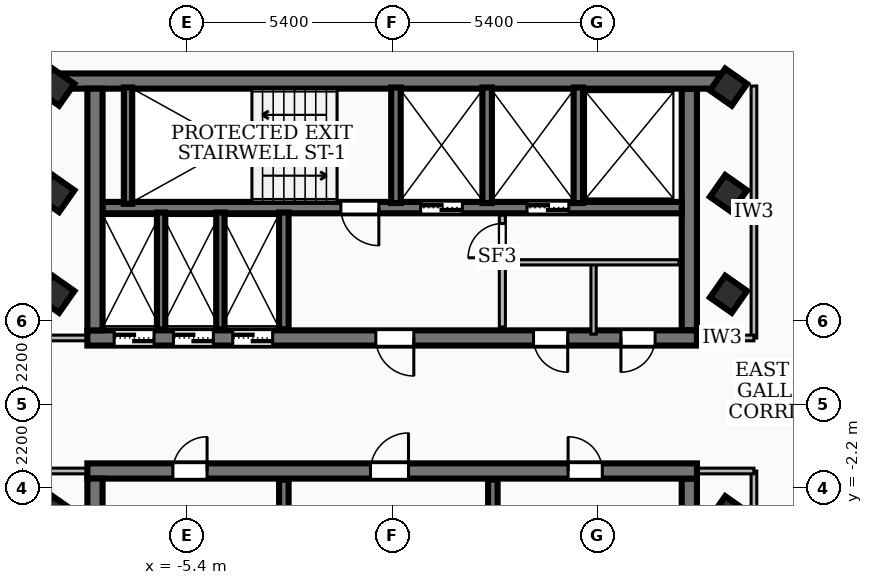
"""IFC4 building model, lengths in metres.
Left out: names, types, materials, properties, quantities, classifications, styles, units other than length and angle.
Written with IfcOpenShell. Run it as: python <this file> out.ifc"""

import sys

from ifc_helpers import new_model, si_unit, direction, frame, frame_2d, origin, origin_2d, place, context, subcontext, project, spatial, rectangle, extrude, element, fill, save


model = new_model("IFC4")
c1 = context("Model", 3, precision=1e-05, world=origin(), true_north=direction((0.0, 1.0)))
c2 = subcontext(c1, "Body", "Model", "MODEL_VIEW")
j1 = project(units=[si_unit("LENGTHUNIT", "METRE"), si_unit("PLANEANGLEUNIT", "RADIAN")], contexts=[c1])
p1 = place(None, origin())
s1 = spatial("IfcSite", under=j1, at=p1, CompositionType="ELEMENT")
p2 = place(p1, origin())
s2 = spatial("IfcBuilding", under=s1, at=p2, CompositionType="ELEMENT")
p3 = place(p2, frame((0.0, 0.0, 268.02)))
s3 = spatial("IfcBuildingStorey", under=s2, at=p3, CompositionType="ELEMENT", Elevation=268.02)
p4 = place(p3, frame((-8.78, 8.51, 0.0), z_axis=(0.0, 0.0, 1.0), x_axis=(1.0, 0.0, 0.0)))
e1 = element("IfcWall", 1, at=p4, inside=s3, PredefinedType="SHEAR", context=c2, shape_type="SweptSolid", body=[
    extrude(rectangle(XDim=17.56, YDim=0.4, at=frame_2d((8.78, 0.0))), origin(), (0.0, 0.0, 1.0), 3.16),
])
p5 = place(p3, frame((8.02, 1.75, 0.0), z_axis=(0.0, 0.0, 1.0), x_axis=(-1.0, 0.0, 0.0)))
e2 = element("IfcWall", 2, at=p5, inside=s3, PredefinedType="SHEAR", context=c2, shape_type="SweptSolid", body=[
    extrude(rectangle(XDim=16.04, YDim=0.4, at=frame_2d((8.02, 0.0))), origin(), (0.0, 0.0, 1.0), 3.16),
])
p6 = place(p5, frame((7.45, 0.0, 0.0)))
e3 = element("IfcOpeningElement", 3, at=p6, cuts=e2, PredefinedType="OPENING", context=c2, shape_type="SweptSolid", body=[
    extrude(rectangle(XDim=1.0, YDim=2.1, at=frame_2d((0.5, 1.05))), frame((0.0, 0.21, 0.0), z_axis=(0.0, -1.0, 0.0), x_axis=(1.0, 0.0, 0.0)), (0.0, 0.0, 1.0), 0.42),
])
p7 = place(p5, frame((14.285, 0.0, 0.0)))
e4 = element("IfcOpeningElement", 4, at=p7, cuts=e2, PredefinedType="OPENING", context=c2, shape_type="SweptSolid", body=[
    extrude(rectangle(XDim=1.05, YDim=2.15, at=frame_2d((0.525, 1.075))), frame((0.0, 0.21, 0.0), z_axis=(0.0, -1.0, 0.0), x_axis=(1.0, 0.0, 0.0)), (0.0, 0.0, 1.0), 0.42),
])
p8 = place(p5, frame((12.725, 0.0, 0.0)))
e5 = element("IfcOpeningElement", 5, at=p8, cuts=e2, PredefinedType="OPENING", context=c2, shape_type="SweptSolid", body=[
    extrude(rectangle(XDim=1.05, YDim=2.15, at=frame_2d((0.525, 1.075))), frame((0.0, 0.21, 0.0), z_axis=(0.0, -1.0, 0.0), x_axis=(1.0, 0.0, 0.0)), (0.0, 0.0, 1.0), 0.42),
])
p9 = place(p5, frame((11.165, 0.0, 0.0)))
e6 = element("IfcOpeningElement", 6, at=p9, cuts=e2, PredefinedType="OPENING", context=c2, shape_type="SweptSolid", body=[
    extrude(rectangle(XDim=1.05, YDim=2.15, at=frame_2d((0.525, 1.075))), frame((0.0, 0.21, 0.0), z_axis=(0.0, -1.0, 0.0), x_axis=(1.0, 0.0, 0.0)), (0.0, 0.0, 1.0), 0.42),
])
p10 = place(p5, frame((3.4, 0.0, 0.0)))
e7 = element("IfcOpeningElement", 7, at=p10, cuts=e2, PredefinedType="OPENING", context=c2, shape_type="SweptSolid", body=[
    extrude(rectangle(XDim=0.9, YDim=2.06, at=frame_2d((0.45, 1.03))), frame((0.0, 0.21, 0.0), z_axis=(0.0, -1.0, 0.0), x_axis=(1.0, 0.0, 0.0)), (0.0, 0.0, 1.0), 0.42),
])
p11 = place(p5, frame((1.1, 0.0, 0.0)))
e8 = element("IfcOpeningElement", 8, at=p11, cuts=e2, PredefinedType="OPENING", context=c2, shape_type="SweptSolid", body=[
    extrude(rectangle(XDim=0.9, YDim=2.06, at=frame_2d((0.45, 1.03))), frame((0.0, 0.21, 0.0), z_axis=(0.0, -1.0, 0.0), x_axis=(1.0, 0.0, 0.0)), (0.0, 0.0, 1.0), 0.42),
])
for number, where, z_axis, x_axis in (
    (9, (-7.82, 1.95, 0.0), (0.0, 0.0, 1.0), (0.0, 1.0, 0.0)),
    (10, (7.82, 8.31, 0.0), (0.0, 0.0, 1.0), (0.0, -1.0, 0.0)),
):
    element("IfcWall", number, at=place(p3, frame(where, z_axis=z_axis, x_axis=x_axis)), inside=s3, PredefinedType="SHEAR", context=c2, shape_type="SweptSolid", body=[
        extrude(rectangle(XDim=6.36, YDim=0.4, at=frame_2d((3.18, 0.0))), origin(), (0.0, 0.0, 1.0), 3.16),
    ])
p12 = place(p3, frame((7.62, 5.18, 0.0), z_axis=(0.0, 0.0, 1.0), x_axis=(-1.0, 0.0, 0.0)))
e11 = element("IfcWall", 11, at=p12, inside=s3, PredefinedType="SOLIDWALL", context=c2, shape_type="SweptSolid", body=[
    extrude(rectangle(XDim=15.24, YDim=0.3, at=frame_2d((7.62, 0.0))), origin(), (0.0, 0.0, 1.0), 3.16),
])
p13 = place(p12, frame((5.77, 0.0, 0.0)))
e12 = element("IfcOpeningElement", 12, at=p13, cuts=e11, PredefinedType="OPENING", context=c2, shape_type="SweptSolid", body=[
    extrude(rectangle(XDim=1.1, YDim=2.15, at=frame_2d((0.55, 1.075))), frame((0.0, 0.16, 0.0), z_axis=(0.0, -1.0, 0.0), x_axis=(1.0, 0.0, 0.0)), (0.0, 0.0, 1.0), 0.32),
])
p14 = place(p12, frame((2.97, 0.0, 0.0)))
e13 = element("IfcOpeningElement", 13, at=p14, cuts=e11, PredefinedType="OPENING", context=c2, shape_type="SweptSolid", body=[
    extrude(rectangle(XDim=1.1, YDim=2.15, at=frame_2d((0.55, 1.075))), frame((0.0, 0.16, 0.0), z_axis=(0.0, -1.0, 0.0), x_axis=(1.0, 0.0, 0.0)), (0.0, 0.0, 1.0), 0.32),
])
p15 = place(p12, frame((7.97, 0.0, 0.0)))
e14 = element("IfcOpeningElement", 14, at=p15, cuts=e11, PredefinedType="OPENING", context=c2, shape_type="SweptSolid", body=[
    extrude(rectangle(XDim=1.0, YDim=2.1, at=frame_2d((0.5, 1.05))), frame((0.0, 0.16, 0.0), z_axis=(0.0, -1.0, 0.0), x_axis=(1.0, 0.0, 0.0)), (0.0, 0.0, 1.0), 0.32),
])
p16 = place(p3, frame((-8.02, -1.75, 0.0), z_axis=(0.0, 0.0, 1.0), x_axis=(1.0, 0.0, 0.0)))
e15 = element("IfcWall", 15, at=p16, inside=s3, PredefinedType="SHEAR", context=c2, shape_type="SweptSolid", body=[
    extrude(rectangle(XDim=16.04, YDim=0.4, at=frame_2d((8.02, 0.0))), origin(), (0.0, 0.0, 1.0), 3.16),
])
p17 = place(p16, frame((7.45, 0.0, 0.0)))
e16 = element("IfcOpeningElement", 16, at=p17, cuts=e15, PredefinedType="OPENING", context=c2, shape_type="SweptSolid", body=[
    extrude(rectangle(XDim=1.0, YDim=2.1, at=frame_2d((0.5, 1.05))), frame((0.0, 0.21, 0.0), z_axis=(0.0, -1.0, 0.0), x_axis=(1.0, 0.0, 0.0)), (0.0, 0.0, 1.0), 0.42),
])
p18 = place(p16, frame((12.65, 0.0, 0.0)))
e17 = element("IfcOpeningElement", 17, at=p18, cuts=e15, PredefinedType="OPENING", context=c2, shape_type="SweptSolid", body=[
    extrude(rectangle(XDim=0.9, YDim=2.06, at=frame_2d((0.45, 1.03))), frame((0.0, 0.21, 0.0), z_axis=(0.0, -1.0, 0.0), x_axis=(1.0, 0.0, 0.0)), (0.0, 0.0, 1.0), 0.42),
])
p19 = place(p16, frame((2.25, 0.0, 0.0)))
e18 = element("IfcOpeningElement", 18, at=p19, cuts=e15, PredefinedType="OPENING", context=c2, shape_type="SweptSolid", body=[
    extrude(rectangle(XDim=0.9, YDim=2.06, at=frame_2d((0.45, 1.03))), frame((0.0, 0.21, 0.0), z_axis=(0.0, -1.0, 0.0), x_axis=(1.0, 0.0, 0.0)), (0.0, 0.0, 1.0), 0.42),
])
for number, where, z_axis, x_axis in (
    (19, (-7.82, -8.31, 0.0), (0.0, 0.0, 1.0), (0.0, 1.0, 0.0)),
    (20, (7.82, -1.95, 0.0), (0.0, 0.0, 1.0), (0.0, -1.0, 0.0)),
):
    element("IfcWall", number, at=place(p3, frame(where, z_axis=z_axis, x_axis=x_axis)), inside=s3, PredefinedType="SHEAR", context=c2, shape_type="SweptSolid", body=[
        extrude(rectangle(XDim=6.36, YDim=0.4, at=frame_2d((3.18, 0.0))), origin(), (0.0, 0.0, 1.0), 3.16),
    ])
p20 = place(p3, frame((-6.95, 5.28, 0.0), z_axis=(0.0, 0.0, 1.0), x_axis=(0.0, 1.0, 0.0)))
e21 = element("IfcWall", 21, at=p20, inside=s3, PredefinedType="SOLIDWALL", context=c2, shape_type="SweptSolid", body=[
    extrude(rectangle(XDim=3.06, YDim=0.22, at=frame_2d((1.53, 0.0))), origin(), (0.0, 0.0, 1.0), 3.16),
])
for number, where, z_axis, x_axis in (
    (22, (0.1, 5.3, 0.0), (0.0, 0.0, 1.0), (0.0, 1.0, 0.0)),
    (23, (2.5, 5.3, 0.0), (0.0, 0.0, 1.0), (0.0, 1.0, 0.0)),
    (24, (4.9, 5.3, 0.0), (0.0, 0.0, 1.0), (0.0, 1.0, 0.0)),
):
    element("IfcWall", number, at=place(p3, frame(where, z_axis=z_axis, x_axis=x_axis)), inside=s3, PredefinedType="SOLIDWALL", context=c2, shape_type="SweptSolid", body=[
        extrude(rectangle(XDim=3.04, YDim=0.25, at=frame_2d((1.52, 0.0))), origin(), (0.0, 0.0, 1.0), 3.16),
    ])
for number, where, z_axis, x_axis in (
    (25, (-2.85, 1.98, 0.0), (0.0, 0.0, 1.0), (0.0, 1.0, 0.0)),
    (26, (-2.85, -5.05, 0.0), (0.0, 0.0, 1.0), (0.0, 1.0, 0.0)),
    (27, (2.65, -5.05, 0.0), (0.0, 0.0, 1.0), (0.0, 1.0, 0.0)),
):
    element("IfcWall", number, at=place(p3, frame(where, z_axis=z_axis, x_axis=x_axis)), inside=s3, PredefinedType="SOLIDWALL", context=c2, shape_type="SweptSolid", body=[
        extrude(rectangle(XDim=3.07, YDim=0.25, at=frame_2d((1.535, 0.0))), origin(), (0.0, 0.0, 1.0), 3.16),
    ])
for number, where, z_axis, x_axis in (
    (28, (-6.08, 1.98, 0.0), (0.0, 0.0, 1.0), (0.0, 1.0, 0.0)),
    (29, (-4.52, 1.98, 0.0), (0.0, 0.0, 1.0), (0.0, 1.0, 0.0)),
):
    element("IfcWall", number, at=place(p3, frame(where, z_axis=z_axis, x_axis=x_axis)), inside=s3, PredefinedType="SOLIDWALL", context=c2, shape_type="SweptSolid", body=[
        extrude(rectangle(XDim=3.07, YDim=0.22, at=frame_2d((1.535, 0.0))), origin(), (0.0, 0.0, 1.0), 3.16),
    ])
for number, where, z_axis, x_axis in (
    (30, (-8.85, -2.9, 0.0), (0.0, 0.0, 1.0), (0.574, 0.819, 0.0)),
    (31, (-8.85, 2.9, 0.0), (0.0, 0.0, 1.0), (0.574, 0.819, 0.0)),
    (32, (-8.85, 5.55, 0.0), (0.0, 0.0, 1.0), (0.574, 0.819, 0.0)),
    (33, (8.85, -2.9, 0.0), (0.0, 0.0, 1.0), (0.574, 0.819, 0.0)),
    (34, (8.85, 2.9, 0.0), (0.0, 0.0, 1.0), (0.574, 0.819, 0.0)),
    (35, (8.85, 5.55, 0.0), (0.0, 0.0, 1.0), (0.574, 0.819, 0.0)),
    (36, (-8.85, 8.35, 0.0), (0.0, 0.0, 1.0), (0.574, 0.819, 0.0)),
    (37, (8.85, 8.35, 0.0), (0.0, 0.0, 1.0), (0.574, 0.819, 0.0)),
):
    element("IfcColumn", number, at=place(p3, frame(where, z_axis=z_axis, x_axis=x_axis)), inside=s3, PredefinedType="COLUMN", context=c2, shape_type="SweptSolid", body=[
        extrude(rectangle(XDim=0.7, YDim=0.7, at=origin_2d()), origin(), (0.0, 0.0, 1.0), 3.42),
    ])
p21 = place(p3, frame((2.9, 2.04, 0.0), z_axis=(0.0, 0.0, 1.0), x_axis=(0.0, 1.0, 0.0)))
e38 = element("IfcWall", 38, at=p21, inside=s3, PredefinedType="PARTITIONING", context=c2, shape_type="SweptSolid", body=[
    extrude(rectangle(XDim=2.94, YDim=0.16, at=frame_2d((1.47, 0.0))), origin(), (0.0, 0.0, 1.0), 2.39),
])
p22 = place(p21, frame((1.82, 0.0, 0.0)))
e39 = element("IfcOpeningElement", 39, at=p22, cuts=e38, PredefinedType="OPENING", context=c2, shape_type="SweptSolid", body=[
    extrude(rectangle(XDim=0.9, YDim=2.06, at=frame_2d((0.45, 1.03))), frame((0.0, 0.09, 0.0), z_axis=(0.0, -1.0, 0.0), x_axis=(1.0, 0.0, 0.0)), (0.0, 0.0, 1.0), 0.18),
])
p23 = place(p3, frame((2.9, 3.74, 0.0), z_axis=(0.0, 0.0, 1.0), x_axis=(1.0, 0.0, 0.0)))
e40 = element("IfcWall", 40, at=p23, inside=s3, PredefinedType="PARTITIONING", context=c2, shape_type="SweptSolid", body=[
    extrude(rectangle(XDim=4.65, YDim=0.138, at=frame_2d((2.325, 0.0))), origin(), (0.0, 0.0, 1.0), 3.16),
])
p24 = place(p3, frame((5.3, 1.85, 0.0), z_axis=(0.0, 0.0, 1.0), x_axis=(0.0, 1.0, 0.0)))
e41 = element("IfcWall", 41, at=p24, inside=s3, PredefinedType="PARTITIONING", context=c2, shape_type="SweptSolid", body=[
    extrude(rectangle(XDim=1.89, YDim=0.138, at=frame_2d((0.945, 0.0))), origin(), (0.0, 0.0, 1.0), 2.39),
])
for number, where, z_axis, x_axis in (
    (42, (-7.85, 1.75, 0.0), (0.0, 0.0, 1.0), (-1.0, 0.0, 0.0)),
    (43, (-7.85, -1.75, 0.0), (0.0, 0.0, 1.0), (-1.0, 0.0, 0.0)),
):
    element("IfcWall", number, at=place(p3, frame(where, z_axis=z_axis, x_axis=x_axis)), inside=s3, PredefinedType="PARTITIONING", context=c2, shape_type="SweptSolid", body=[
        extrude(rectangle(XDim=1.67, YDim=0.15, at=frame_2d((0.835, 0.0))), origin(), (0.0, 0.0, 1.0), 2.39),
    ])
p25 = place(p3, frame((9.52, 1.75, 0.0), z_axis=(0.0, 0.0, 1.0), x_axis=(0.0, 1.0, 0.0)))
e44 = element("IfcWall", 44, at=p25, inside=s3, PredefinedType="PARTITIONING", context=c2, shape_type="SweptSolid", body=[
    extrude(rectangle(XDim=6.63, YDim=0.15, at=frame_2d((3.315, 0.0))), origin(), (0.0, 0.0, 1.0), 3.16),
])
p26 = place(p3, frame((7.85, 1.75, 0.0), z_axis=(0.0, 0.0, 1.0), x_axis=(1.0, 0.0, 0.0)))
e45 = element("IfcWall", 45, at=p26, inside=s3, PredefinedType="PARTITIONING", context=c2, shape_type="SweptSolid", body=[
    extrude(rectangle(XDim=1.67, YDim=0.15, at=frame_2d((0.835, 0.0))), origin(), (0.0, 0.0, 1.0), 2.39),
])
p27 = place(p3, frame((9.52, -8.38, 0.0), z_axis=(0.0, 0.0, 1.0), x_axis=(0.0, 1.0, 0.0)))
e46 = element("IfcWall", 46, at=p27, inside=s3, PredefinedType="PARTITIONING", context=c2, shape_type="SweptSolid", body=[
    extrude(rectangle(XDim=6.63, YDim=0.15, at=frame_2d((3.315, 0.0))), origin(), (0.0, 0.0, 1.0), 2.53),
])
p28 = place(p3, frame((7.85, -1.75, 0.0), z_axis=(0.0, 0.0, 1.0), x_axis=(1.0, 0.0, 0.0)))
e47 = element("IfcWall", 47, at=p28, inside=s3, PredefinedType="PARTITIONING", context=c2, shape_type="SweptSolid", body=[
    extrude(rectangle(XDim=1.67, YDim=0.15, at=frame_2d((0.835, 0.0))), origin(), (0.0, 0.0, 1.0), 2.39),
])
p29 = place(p3, frame((15.835, 6.349, 0.0), z_axis=(0.0, 0.0, 1.0), x_axis=(-0.818780073776, 0.57410729902, 0.0)))
e48 = element("IfcWall", 48, at=p29, inside=s3, PredefinedType="PARTITIONING", context=c2, shape_type="SweptSolid", body=[
    extrude(rectangle(XDim=7.95, YDim=0.145, at=frame_2d((3.975, 0.0))), origin(), (0.0, 0.0, 1.0), 2.53),
])
p30 = place(p3, frame((-17.625, -0.245, 0.0), z_axis=(0.0, 0.0, 1.0), x_axis=(0.574126736534, 0.818766444352, 0.0)))
e49 = element("IfcWall", 49, at=p30, inside=s3, PredefinedType="PARTITIONING", context=c2, shape_type="SweptSolid", body=[
    extrude(rectangle(XDim=20.34, YDim=0.145, at=frame_2d((10.17, 0.0))), origin(), (0.0, 0.0, 1.0), 2.53),
])
p31 = place(p30, frame((11.16, 0.0, 0.0)))
e50 = element("IfcOpeningElement", 50, at=p31, cuts=e49, PredefinedType="OPENING", context=c2, shape_type="SweptSolid", body=[
    extrude(rectangle(XDim=0.86, YDim=2.04, at=frame_2d((0.43, 1.02))), frame((0.0, 0.083, 0.0), z_axis=(0.0, -1.0, 0.0), x_axis=(1.0, 0.0, 0.0)), (0.0, 0.0, 1.0), 0.165),
])
p32 = place(p30, frame((9.72, 0.0, 0.0)))
e51 = element("IfcOpeningElement", 51, at=p32, cuts=e49, PredefinedType="OPENING", context=c2, shape_type="SweptSolid", body=[
    extrude(rectangle(XDim=0.86, YDim=2.04, at=frame_2d((0.43, 1.02))), frame((0.0, 0.083, 0.0), z_axis=(0.0, -1.0, 0.0), x_axis=(1.0, 0.0, 0.0)), (0.0, 0.0, 1.0), 0.165),
])
p33 = place(p3, frame((17.625, 0.245, 0.0), z_axis=(0.0, 0.0, 1.0), x_axis=(-0.574126736534, -0.818766444352, 0.0)))
e52 = element("IfcWall", 52, at=p33, inside=s3, PredefinedType="PARTITIONING", context=c2, shape_type="SweptSolid", body=[
    extrude(rectangle(XDim=20.34, YDim=0.145, at=frame_2d((10.17, 0.0))), origin(), (0.0, 0.0, 1.0), 2.53),
])
p34 = place(p33, frame((11.16, 0.0, 0.0)))
e53 = element("IfcOpeningElement", 53, at=p34, cuts=e52, PredefinedType="OPENING", context=c2, shape_type="SweptSolid", body=[
    extrude(rectangle(XDim=0.86, YDim=2.04, at=frame_2d((0.43, 1.02))), frame((0.0, 0.083, 0.0), z_axis=(0.0, -1.0, 0.0), x_axis=(1.0, 0.0, 0.0)), (0.0, 0.0, 1.0), 0.165),
])
p35 = place(p33, frame((9.72, 0.0, 0.0)))
e54 = element("IfcOpeningElement", 54, at=p35, cuts=e52, PredefinedType="OPENING", context=c2, shape_type="SweptSolid", body=[
    extrude(rectangle(XDim=0.86, YDim=2.04, at=frame_2d((0.43, 1.02))), frame((0.0, 0.083, 0.0), z_axis=(0.0, -1.0, 0.0), x_axis=(1.0, 0.0, 0.0)), (0.0, 0.0, 1.0), 0.165),
])
p36 = place(p6, origin())
e55 = element("IfcDoor", 55, at=p36, inside=s3, OperationType="SINGLE_SWING_LEFT", PredefinedType="DOOR", context=c2, shape_type="SweptSolid", body=[
    extrude(rectangle(XDim=1.0, YDim=2.1, at=frame_2d((0.5, 1.05))), frame((0.0, 0.025, 0.0), z_axis=(0.0, -1.0, 0.0), x_axis=(1.0, 0.0, 0.0)), (0.0, 0.0, 1.0), 0.05),
])
fill(e3, e55)
p37 = place(p17, origin())
e56 = element("IfcDoor", 56, at=p37, inside=s3, OperationType="SINGLE_SWING_RIGHT", PredefinedType="DOOR", context=c2, shape_type="SweptSolid", body=[
    extrude(rectangle(XDim=1.0, YDim=2.1, at=frame_2d((0.5, 1.05))), frame((0.0, 0.025, 0.0), z_axis=(0.0, -1.0, 0.0), x_axis=(1.0, 0.0, 0.0)), (0.0, 0.0, 1.0), 0.05),
])
fill(e16, e56)
p38 = place(p13, origin())
e57 = element("IfcDoor", 57, at=p38, inside=s3, OperationType="DOUBLE_DOOR_SLIDING", PredefinedType="DOOR", context=c2, shape_type="SweptSolid", body=[
    extrude(rectangle(XDim=1.1, YDim=2.15, at=frame_2d((0.55, 1.075))), frame((0.0, 0.025, 0.0), z_axis=(0.0, -1.0, 0.0), x_axis=(1.0, 0.0, 0.0)), (0.0, 0.0, 1.0), 0.05),
])
fill(e12, e57)
p39 = place(p14, origin())
e58 = element("IfcDoor", 58, at=p39, inside=s3, OperationType="DOUBLE_DOOR_SLIDING", PredefinedType="DOOR", context=c2, shape_type="SweptSolid", body=[
    extrude(rectangle(XDim=1.1, YDim=2.15, at=frame_2d((0.55, 1.075))), frame((0.0, 0.025, 0.0), z_axis=(0.0, -1.0, 0.0), x_axis=(1.0, 0.0, 0.0)), (0.0, 0.0, 1.0), 0.05),
])
fill(e13, e58)
p40 = place(p15, origin())
e59 = element("IfcDoor", 59, at=p40, inside=s3, OperationType="SINGLE_SWING_LEFT", PredefinedType="DOOR", context=c2, shape_type="SweptSolid", body=[
    extrude(rectangle(XDim=1.0, YDim=2.1, at=frame_2d((0.5, 1.05))), frame((0.0, 0.025, 0.0), z_axis=(0.0, -1.0, 0.0), x_axis=(1.0, 0.0, 0.0)), (0.0, 0.0, 1.0), 0.05),
])
fill(e14, e59)
p41 = place(p7, origin())
e60 = element("IfcDoor", 60, at=p41, inside=s3, OperationType="DOUBLE_DOOR_SLIDING", PredefinedType="DOOR", context=c2, shape_type="SweptSolid", body=[
    extrude(rectangle(XDim=1.05, YDim=2.15, at=frame_2d((0.525, 1.075))), frame((0.0, 0.025, 0.0), z_axis=(0.0, -1.0, 0.0), x_axis=(1.0, 0.0, 0.0)), (0.0, 0.0, 1.0), 0.05),
])
fill(e4, e60)
p42 = place(p8, origin())
e61 = element("IfcDoor", 61, at=p42, inside=s3, OperationType="DOUBLE_DOOR_SLIDING", PredefinedType="DOOR", context=c2, shape_type="SweptSolid", body=[
    extrude(rectangle(XDim=1.05, YDim=2.15, at=frame_2d((0.525, 1.075))), frame((0.0, 0.025, 0.0), z_axis=(0.0, -1.0, 0.0), x_axis=(1.0, 0.0, 0.0)), (0.0, 0.0, 1.0), 0.05),
])
fill(e5, e61)
p43 = place(p9, origin())
e62 = element("IfcDoor", 62, at=p43, inside=s3, OperationType="DOUBLE_DOOR_SLIDING", PredefinedType="DOOR", context=c2, shape_type="SweptSolid", body=[
    extrude(rectangle(XDim=1.05, YDim=2.15, at=frame_2d((0.525, 1.075))), frame((0.0, 0.025, 0.0), z_axis=(0.0, -1.0, 0.0), x_axis=(1.0, 0.0, 0.0)), (0.0, 0.0, 1.0), 0.05),
])
fill(e6, e62)
p44 = place(p18, origin())
e63 = element("IfcDoor", 63, at=p44, inside=s3, OperationType="SINGLE_SWING_LEFT", PredefinedType="DOOR", context=c2, shape_type="SweptSolid", body=[
    extrude(rectangle(XDim=0.9, YDim=2.06, at=frame_2d((0.45, 1.03))), frame((0.0, 0.025, 0.0), z_axis=(0.0, -1.0, 0.0), x_axis=(1.0, 0.0, 0.0)), (0.0, 0.0, 1.0), 0.05),
])
fill(e17, e63)
p45 = place(p19, origin())
e64 = element("IfcDoor", 64, at=p45, inside=s3, OperationType="SINGLE_SWING_RIGHT", PredefinedType="DOOR", context=c2, shape_type="SweptSolid", body=[
    extrude(rectangle(XDim=0.9, YDim=2.06, at=frame_2d((0.45, 1.03))), frame((0.0, 0.025, 0.0), z_axis=(0.0, -1.0, 0.0), x_axis=(1.0, 0.0, 0.0)), (0.0, 0.0, 1.0), 0.05),
])
fill(e18, e64)
p46 = place(p10, origin())
e65 = element("IfcDoor", 65, at=p46, inside=s3, OperationType="SINGLE_SWING_LEFT", PredefinedType="DOOR", context=c2, shape_type="SweptSolid", body=[
    extrude(rectangle(XDim=0.9, YDim=2.06, at=frame_2d((0.45, 1.03))), frame((0.0, 0.025, 0.0), z_axis=(0.0, -1.0, 0.0), x_axis=(1.0, 0.0, 0.0)), (0.0, 0.0, 1.0), 0.05),
])
fill(e7, e65)
p47 = place(p11, origin())
e66 = element("IfcDoor", 66, at=p47, inside=s3, OperationType="SINGLE_SWING_RIGHT", PredefinedType="DOOR", context=c2, shape_type="SweptSolid", body=[
    extrude(rectangle(XDim=0.9, YDim=2.06, at=frame_2d((0.45, 1.03))), frame((0.0, 0.025, 0.0), z_axis=(0.0, -1.0, 0.0), x_axis=(1.0, 0.0, 0.0)), (0.0, 0.0, 1.0), 0.05),
])
fill(e8, e66)
p48 = place(p22, origin())
e67 = element("IfcDoor", 67, at=p48, inside=s3, OperationType="SINGLE_SWING_LEFT", PredefinedType="DOOR", context=c2, shape_type="SweptSolid", body=[
    extrude(rectangle(XDim=0.9, YDim=2.06, at=frame_2d((0.45, 1.03))), frame((0.0, 0.025, 0.0), z_axis=(0.0, -1.0, 0.0), x_axis=(1.0, 0.0, 0.0)), (0.0, 0.0, 1.0), 0.05),
])
fill(e39, e67)
save(model, sys.argv[1])
